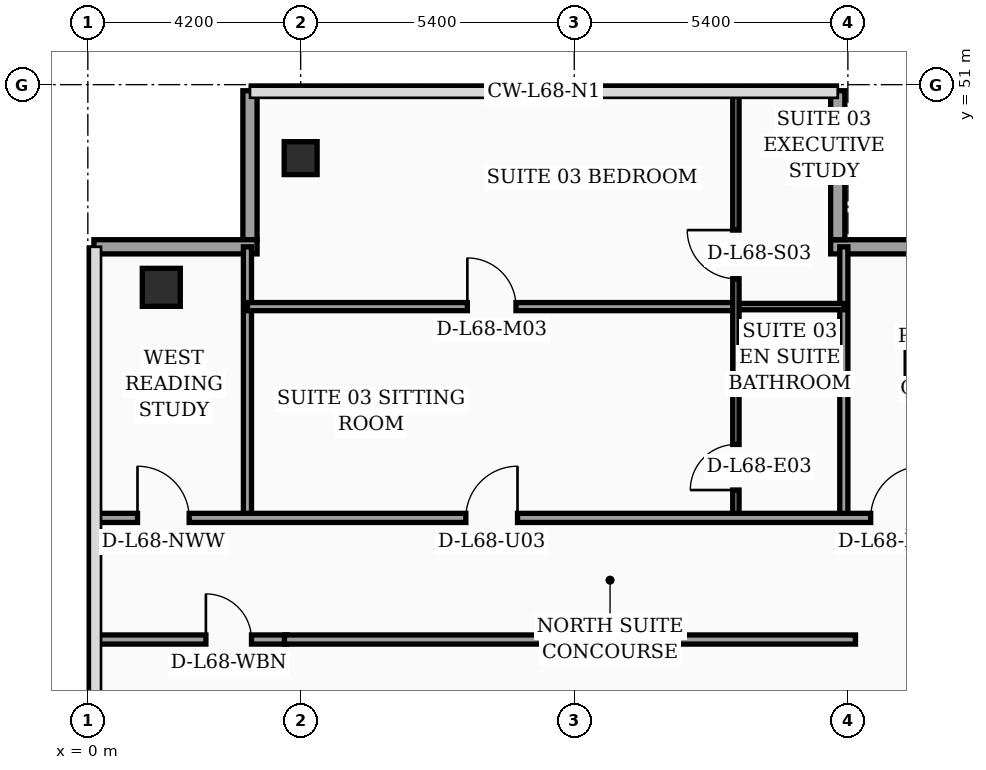
"""IFC4 building model, lengths in metres.
Left out: names, types, materials, properties, quantities, classifications, styles, units other than length and angle.
Written with IfcOpenShell. Run it as: python <this file> out.ifc"""

import sys

from ifc_helpers import new_model, si_unit, direction, frame, frame_2d, origin, origin_2d, place, context, subcontext, project, spatial, rectangle, hollow_rectangle, extrude, element, fill, save


model = new_model("IFC4")
c1 = context("Model", 3, precision=1e-05, world=origin(), true_north=direction((0.0, 1.0)))
c2 = subcontext(c1, "Body", "Model", "MODEL_VIEW")
j1 = project(units=[si_unit("LENGTHUNIT", "METRE"), si_unit("PLANEANGLEUNIT", "RADIAN")], contexts=[c1])
p1 = place(None, origin())
s1 = spatial("IfcSite", under=j1, at=p1, CompositionType="ELEMENT")
p2 = place(p1, origin())
s2 = spatial("IfcBuilding", under=s1, at=p2, CompositionType="ELEMENT")
p3 = place(p2, frame((0.0, 0.0, 274.9)))
s3 = spatial("IfcBuildingStorey", under=s2, at=p3, CompositionType="ELEMENT", Elevation=274.9)
p4 = place(p3, frame((1.45, 47.0, 0.0), z_axis=(0.0, 0.0, 1.0), x_axis=(1.0, 0.0, 0.0)))
e1 = element("IfcColumn", 1, at=p4, inside=s3, PredefinedType="COLUMN", context=c2, shape_type="SweptSolid", body=[
    extrude(hollow_rectangle(XDim=0.75, YDim=0.75, WallThickness=0.032, at=origin_2d()), origin(), (0.0, 0.0, 1.0), 3.56),
])
p5 = place(p3, frame((4.2, 49.55, 0.0), z_axis=(0.0, 0.0, 1.0), x_axis=(1.0, 0.0, 0.0)))
e2 = element("IfcColumn", 2, at=p5, inside=s3, PredefinedType="COLUMN", context=c2, shape_type="SweptSolid", body=[
    extrude(hollow_rectangle(XDim=0.65, YDim=0.65, WallThickness=0.028, at=origin_2d()), origin(), (0.0, 0.0, 1.0), 3.56),
])
p6 = place(p3, frame((17.9, 47.8, 0.0), z_axis=(0.0, 0.0, 1.0), x_axis=(-1.0, 0.0, 0.0)))
e3 = element("IfcWall", 3, at=p6, inside=s3, PredefinedType="SOLIDWALL", context=c2, shape_type="SweptSolid", body=[
    extrude(rectangle(XDim=3.24, YDim=0.28, at=frame_2d((1.62, 0.0))), origin(), (0.0, 0.0, 1.0), 3.56),
])
p7 = place(p3, frame((14.8, 47.94, 0.0), z_axis=(0.0, 0.0, 1.0), x_axis=(0.0, 1.0, 0.0)))
e4 = element("IfcWall", 4, at=p7, inside=s3, PredefinedType="SOLIDWALL", context=c2, shape_type="SweptSolid", body=[
    extrude(rectangle(XDim=2.94, YDim=0.28, at=frame_2d((1.47, 0.0))), origin(), (0.0, 0.0, 1.0), 3.56),
])
p8 = place(p3, frame((3.2, 50.88, 0.0), z_axis=(0.0, 0.0, 1.0), x_axis=(0.0, -1.0, 0.0)))
e5 = element("IfcWall", 5, at=p8, inside=s3, PredefinedType="SOLIDWALL", context=c2, shape_type="SweptSolid", body=[
    extrude(rectangle(XDim=2.94, YDim=0.28, at=frame_2d((1.47, 0.0))), origin(), (0.0, 0.0, 1.0), 3.09),
])
p9 = place(p3, frame((3.34, 47.8, 0.0), z_axis=(0.0, 0.0, 1.0), x_axis=(-1.0, 0.0, 0.0)))
e6 = element("IfcWall", 6, at=p9, inside=s3, PredefinedType="SOLIDWALL", context=c2, shape_type="SweptSolid", body=[
    extrude(rectangle(XDim=3.22, YDim=0.28, at=frame_2d((1.61, 0.0))), origin(), (0.0, 0.0, 1.0), 3.09),
])
p10 = place(p3, frame((0.08, 40.05, 0.0), z_axis=(0.0, 0.0, 1.0), x_axis=(1.0, 0.0, 0.0)))
e7 = element("IfcWall", 7, at=p10, inside=s3, PredefinedType="PARTITIONING", context=c2, shape_type="SweptSolid", body=[
    extrude(rectangle(XDim=3.85, YDim=0.18, at=frame_2d((1.925, 0.0))), origin(), (0.0, 0.0, 1.0), 2.99),
])
p11 = place(p10, frame((2.25, 0.0, 0.0)))
e8 = element("IfcOpeningElement", 8, at=p11, cuts=e7, PredefinedType="OPENING", context=c2, shape_type="SweptSolid", body=[
    extrude(rectangle(XDim=0.9, YDim=2.15, at=frame_2d((0.45, 1.075))), frame((0.0, 0.1, 0.0), z_axis=(0.0, -1.0, 0.0), x_axis=(1.0, 0.0, 0.0)), (0.0, 0.0, 1.0), 0.2),
])
p12 = place(p3, frame((3.15, 42.45, 0.0), z_axis=(0.0, 0.0, 1.0), x_axis=(0.0, 1.0, 0.0)))
e9 = element("IfcWall", 9, at=p12, inside=s3, PredefinedType="PARTITIONING", context=c2, shape_type="SweptSolid", body=[
    extrude(rectangle(XDim=5.35, YDim=0.16, at=frame_2d((2.675, 0.0))), origin(), (0.0, 0.0, 1.0), 3.14),
])
p13 = place(p3, frame((14.92, 42.45, 0.0), z_axis=(0.0, 0.0, 1.0), x_axis=(0.0, 1.0, 0.0)))
e10 = element("IfcWall", 10, at=p13, inside=s3, PredefinedType="PARTITIONING", context=c2, shape_type="SweptSolid", body=[
    extrude(rectangle(XDim=5.35, YDim=0.16, at=frame_2d((2.675, 0.0))), origin(), (0.0, 0.0, 1.0), 3.09),
])
p14 = place(p3, frame((12.79, 46.62, 0.0), z_axis=(0.0, 0.0, 1.0), x_axis=(1.0, 0.0, 0.0)))
e11 = element("IfcWall", 11, at=p14, inside=s3, PredefinedType="PARTITIONING", context=c2, shape_type="SweptSolid", body=[
    extrude(rectangle(XDim=2.13, YDim=0.125, at=frame_2d((1.065, 0.0))), origin(), (0.0, 0.0, 1.0), 3.09),
])
p15 = place(p3, frame((3.15, 46.62, 0.0), z_axis=(0.0, 0.0, 1.0), x_axis=(1.0, 0.0, 0.0)))
e12 = element("IfcWall", 12, at=p15, inside=s3, PredefinedType="PARTITIONING", context=c2, shape_type="SweptSolid", body=[
    extrude(rectangle(XDim=9.64, YDim=0.16, at=frame_2d((4.82, 0.0))), origin(), (0.0, 0.0, 1.0), 2.99),
])
p16 = place(p15, frame((4.34, 0.0, 0.0)))
e13 = element("IfcOpeningElement", 13, at=p16, cuts=e12, PredefinedType="OPENING", context=c2, shape_type="SweptSolid", body=[
    extrude(rectangle(XDim=0.96, YDim=2.2, at=frame_2d((0.48, 1.1))), frame((0.0, 0.09, 0.0), z_axis=(0.0, -1.0, 0.0), x_axis=(1.0, 0.0, 0.0)), (0.0, 0.0, 1.0), 0.18),
])
p17 = place(p3, frame((12.79, 42.45, 0.0), z_axis=(0.0, 0.0, 1.0), x_axis=(0.0, 1.0, 0.0)))
e14 = element("IfcWall", 14, at=p17, inside=s3, PredefinedType="PARTITIONING", context=c2, shape_type="SweptSolid", body=[
    extrude(rectangle(XDim=8.49, YDim=0.125, at=frame_2d((4.245, 0.0))), origin(), (0.0, 0.0, 1.0), 3.09),
])
p18 = place(p17, frame((0.55, 0.0, 0.0)))
e15 = element("IfcOpeningElement", 15, at=p18, cuts=e14, PredefinedType="OPENING", context=c2, shape_type="SweptSolid", body=[
    extrude(rectangle(XDim=0.9, YDim=2.15, at=frame_2d((0.45, 1.075))), frame((0.0, 0.073, 0.0), z_axis=(0.0, -1.0, 0.0), x_axis=(1.0, 0.0, 0.0)), (0.0, 0.0, 1.0), 0.145),
])
p19 = place(p17, frame((4.72, 0.0, 0.0)))
e16 = element("IfcOpeningElement", 16, at=p19, cuts=e14, PredefinedType="OPENING", context=c2, shape_type="SweptSolid", body=[
    extrude(rectangle(XDim=0.96, YDim=2.2, at=frame_2d((0.48, 1.1))), frame((0.0, 0.073, 0.0), z_axis=(0.0, -1.0, 0.0), x_axis=(1.0, 0.0, 0.0)), (0.0, 0.0, 1.0), 0.145),
])
p20 = place(p3, frame((0.08, 42.45, 0.0), z_axis=(0.0, 0.0, 1.0), x_axis=(1.0, 0.0, 0.0)))
e17 = element("IfcWall", 17, at=p20, inside=s3, PredefinedType="PARTITIONING", context=c2, shape_type="SweptSolid", body=[
    extrude(rectangle(XDim=17.77, YDim=0.18, at=frame_2d((8.885, 0.0))), origin(), (0.0, 0.0, 1.0), 2.99),
])
p21 = place(p20, frame((0.9, 0.0, 0.0)))
e18 = element("IfcOpeningElement", 18, at=p21, cuts=e17, PredefinedType="OPENING", context=c2, shape_type="SweptSolid", body=[
    extrude(rectangle(XDim=1.02, YDim=2.2, at=frame_2d((0.51, 1.1))), frame((0.0, 0.1, 0.0), z_axis=(0.0, -1.0, 0.0), x_axis=(1.0, 0.0, 0.0)), (0.0, 0.0, 1.0), 0.2),
])
p22 = place(p20, frame((7.38, 0.0, 0.0)))
e19 = element("IfcOpeningElement", 19, at=p22, cuts=e17, PredefinedType="OPENING", context=c2, shape_type="SweptSolid", body=[
    extrude(rectangle(XDim=1.02, YDim=2.2, at=frame_2d((0.51, 1.1))), frame((0.0, 0.1, 0.0), z_axis=(0.0, -1.0, 0.0), x_axis=(1.0, 0.0, 0.0)), (0.0, 0.0, 1.0), 0.2),
])
p23 = place(p20, frame((15.37, 0.0, 0.0)))
e20 = element("IfcOpeningElement", 20, at=p23, cuts=e17, PredefinedType="OPENING", context=c2, shape_type="SweptSolid", body=[
    extrude(rectangle(XDim=1.02, YDim=2.2, at=frame_2d((0.51, 1.1))), frame((0.0, 0.1, 0.0), z_axis=(0.0, -1.0, 0.0), x_axis=(1.0, 0.0, 0.0)), (0.0, 0.0, 1.0), 0.2),
])
p24 = place(p3, frame((3.88, 40.05, 0.0), z_axis=(0.0, 0.0, 1.0), x_axis=(1.0, 0.0, 0.0)))
e21 = element("IfcWall", 21, at=p24, inside=s3, PredefinedType="PARTITIONING", context=c2, shape_type="SweptSolid", body=[
    extrude(rectangle(XDim=11.27, YDim=0.18, at=frame_2d((5.635, 0.0))), origin(), (0.0, 0.0, 1.0), 2.99),
])
p25 = place(p11, origin())
e22 = element("IfcDoor", 22, at=p25, inside=s3, OperationType="SINGLE_SWING_LEFT", PredefinedType="DOOR", context=c2, shape_type="SweptSolid", body=[
    extrude(rectangle(XDim=0.9, YDim=2.15, at=frame_2d((0.45, 1.075))), frame((0.0, 0.025, 0.0), z_axis=(0.0, -1.0, 0.0), x_axis=(1.0, 0.0, 0.0)), (0.0, 0.0, 1.0), 0.05),
])
fill(e8, e22)
p26 = place(p16, origin())
e23 = element("IfcDoor", 23, at=p26, inside=s3, OperationType="SINGLE_SWING_LEFT", PredefinedType="DOOR", context=c2, shape_type="SweptSolid", body=[
    extrude(rectangle(XDim=0.96, YDim=2.2, at=frame_2d((0.48, 1.1))), frame((0.0, 0.025, 0.0), z_axis=(0.0, -1.0, 0.0), x_axis=(1.0, 0.0, 0.0)), (0.0, 0.0, 1.0), 0.05),
])
fill(e13, e23)
p27 = place(p18, origin())
e24 = element("IfcDoor", 24, at=p27, inside=s3, OperationType="SINGLE_SWING_LEFT", PredefinedType="DOOR", context=c2, shape_type="SweptSolid", body=[
    extrude(rectangle(XDim=0.9, YDim=2.15, at=frame_2d((0.45, 1.075))), frame((0.0, 0.025, 0.0), z_axis=(0.0, -1.0, 0.0), x_axis=(1.0, 0.0, 0.0)), (0.0, 0.0, 1.0), 0.05),
])
fill(e15, e24)
p28 = place(p19, origin())
e25 = element("IfcDoor", 25, at=p28, inside=s3, OperationType="SINGLE_SWING_RIGHT", PredefinedType="DOOR", context=c2, shape_type="SweptSolid", body=[
    extrude(rectangle(XDim=0.96, YDim=2.2, at=frame_2d((0.48, 1.1))), frame((0.0, 0.025, 0.0), z_axis=(0.0, -1.0, 0.0), x_axis=(1.0, 0.0, 0.0)), (0.0, 0.0, 1.0), 0.05),
])
fill(e16, e25)
p29 = place(p21, origin())
e26 = element("IfcDoor", 26, at=p29, inside=s3, OperationType="SINGLE_SWING_LEFT", PredefinedType="DOOR", context=c2, shape_type="SweptSolid", body=[
    extrude(rectangle(XDim=1.02, YDim=2.2, at=frame_2d((0.51, 1.1))), frame((0.0, 0.025, 0.0), z_axis=(0.0, -1.0, 0.0), x_axis=(1.0, 0.0, 0.0)), (0.0, 0.0, 1.0), 0.05),
])
fill(e18, e26)
p30 = place(p22, origin())
e27 = element("IfcDoor", 27, at=p30, inside=s3, OperationType="SINGLE_SWING_RIGHT", PredefinedType="DOOR", context=c2, shape_type="SweptSolid", body=[
    extrude(rectangle(XDim=1.02, YDim=2.2, at=frame_2d((0.51, 1.1))), frame((0.0, 0.025, 0.0), z_axis=(0.0, -1.0, 0.0), x_axis=(1.0, 0.0, 0.0)), (0.0, 0.0, 1.0), 0.05),
])
fill(e19, e27)
p31 = place(p23, origin())
e28 = element("IfcDoor", 28, at=p31, inside=s3, OperationType="SINGLE_SWING_RIGHT", PredefinedType="DOOR", context=c2, shape_type="SweptSolid", body=[
    extrude(rectangle(XDim=1.02, YDim=2.2, at=frame_2d((0.51, 1.1))), frame((0.0, 0.025, 0.0), z_axis=(0.0, -1.0, 0.0), x_axis=(1.0, 0.0, 0.0)), (0.0, 0.0, 1.0), 0.05),
])
fill(e20, e28)
save(model, sys.argv[1])
